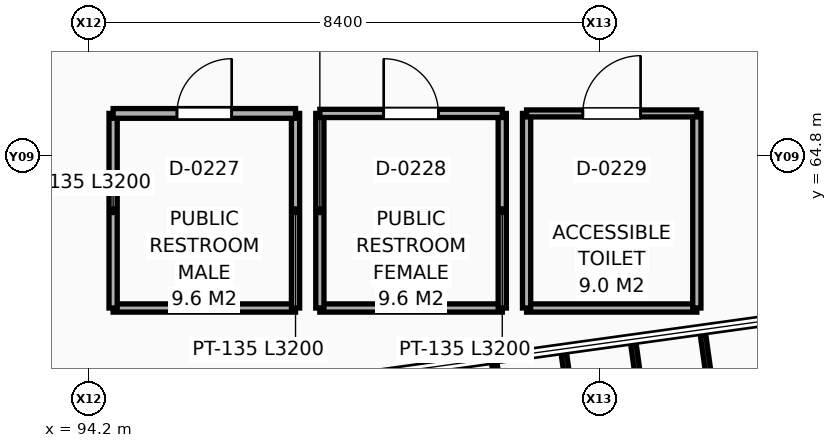
"""IFC4 building model, lengths in metres.
Left out: names, types, materials, properties, quantities, classifications, styles, units other than length and angle.
Written with IfcOpenShell. Run it as: python <this file> out.ifc"""

import sys

from ifc_helpers import new_model, si_unit, direction, frame, frame_2d, origin, place, context, subcontext, project, spatial, rectangle, extrude, element, fill, save


model = new_model("IFC4")
c1 = context("Model", 3, precision=1e-05, world=origin(), true_north=direction((0.0, 1.0)))
c2 = subcontext(c1, "Body", "Model", "MODEL_VIEW")
j1 = project(units=[si_unit("LENGTHUNIT", "METRE"), si_unit("PLANEANGLEUNIT", "RADIAN")], contexts=[c1])
p1 = place(None, origin())
s1 = spatial("IfcSite", under=j1, at=p1, CompositionType="ELEMENT")
p2 = place(p1, origin())
s2 = spatial("IfcBuilding", under=s1, at=p2, CompositionType="ELEMENT")
p3 = place(p2, frame((0.0, 0.0, 13.8)))
s3 = spatial("IfcBuildingStorey", under=s2, at=p3, CompositionType="ELEMENT", Elevation=13.8)
p4 = place(p3, frame((94.6, 62.3, 0.0), z_axis=(0.0, 0.0, 1.0), x_axis=(1.0, 0.0, 0.0)))
e1 = element("IfcWall", 1, at=p4, inside=s3, PredefinedType="PARTITIONING", context=c2, shape_type="SweptSolid", body=[
    extrude(rectangle(XDim=3.0, YDim=0.135, at=frame_2d((1.5, 0.0))), origin(), (0.0, 0.0, 1.0), 3.86),
])
for number, where, z_axis, x_axis in (
    (2, (97.6, 62.3, 0.0), (0.0, 0.0, 1.0), (0.0, 1.0, 0.0)),
    (3, (94.6, 62.3, 0.0), (0.0, 0.0, 1.0), (0.0, 1.0, 0.0)),
):
    element("IfcWall", number, at=place(p3, frame(where, z_axis=z_axis, x_axis=x_axis)), inside=s3, PredefinedType="PARTITIONING", context=c2, shape_type="SweptSolid", body=[
        extrude(rectangle(XDim=3.2, YDim=0.135, at=frame_2d((1.6, 0.0))), origin(), (0.0, 0.0, 1.0), 3.86),
    ])
p5 = place(p3, frame((94.6, 65.5, 0.0), z_axis=(0.0, 0.0, 1.0), x_axis=(1.0, 0.0, 0.0)))
e4 = element("IfcWall", 4, at=p5, inside=s3, PredefinedType="PARTITIONING", context=c2, shape_type="SweptSolid", body=[
    extrude(rectangle(XDim=3.0, YDim=0.16, at=frame_2d((1.5, 0.0))), origin(), (0.0, 0.0, 1.0), 3.86),
])
p6 = place(p5, frame((1.05, 0.0, 0.0)))
e5 = element("IfcOpeningElement", 5, at=p6, cuts=e4, PredefinedType="OPENING", context=c2, shape_type="SweptSolid", body=[
    extrude(rectangle(XDim=0.9, YDim=2.1, at=frame_2d((0.45, 1.05))), frame((0.0, 0.09, 0.0), z_axis=(0.0, -1.0, 0.0), x_axis=(1.0, 0.0, 0.0)), (0.0, 0.0, 1.0), 0.18),
])
p7 = place(p3, frame((98.0, 62.3, 0.0), z_axis=(0.0, 0.0, 1.0), x_axis=(1.0, 0.0, 0.0)))
e6 = element("IfcWall", 6, at=p7, inside=s3, PredefinedType="PARTITIONING", context=c2, shape_type="SweptSolid", body=[
    extrude(rectangle(XDim=3.0, YDim=0.135, at=frame_2d((1.5, 0.0))), origin(), (0.0, 0.0, 1.0), 3.86),
])
for number, where, z_axis, x_axis in (
    (7, (101.0, 62.3, 0.0), (0.0, 0.0, 1.0), (0.0, 1.0, 0.0)),
    (8, (98.0, 62.3, 0.0), (0.0, 0.0, 1.0), (0.0, 1.0, 0.0)),
):
    element("IfcWall", number, at=place(p3, frame(where, z_axis=z_axis, x_axis=x_axis)), inside=s3, PredefinedType="PARTITIONING", context=c2, shape_type="SweptSolid", body=[
        extrude(rectangle(XDim=3.2, YDim=0.135, at=frame_2d((1.6, 0.0))), origin(), (0.0, 0.0, 1.0), 3.86),
    ])
p8 = place(p3, frame((98.0, 65.5, 0.0), z_axis=(0.0, 0.0, 1.0), x_axis=(1.0, 0.0, 0.0)))
e9 = element("IfcWall", 9, at=p8, inside=s3, PredefinedType="PARTITIONING", context=c2, shape_type="SweptSolid", body=[
    extrude(rectangle(XDim=3.0, YDim=0.135, at=frame_2d((1.5, 0.0))), origin(), (0.0, 0.0, 1.0), 3.86),
])
p9 = place(p8, frame((1.05, 0.0, 0.0)))
e10 = element("IfcOpeningElement", 10, at=p9, cuts=e9, PredefinedType="OPENING", context=c2, shape_type="SweptSolid", body=[
    extrude(rectangle(XDim=0.9, YDim=2.1, at=frame_2d((0.45, 1.05))), frame((0.0, 0.077, 0.0), z_axis=(0.0, -1.0, 0.0), x_axis=(1.0, 0.0, 0.0)), (0.0, 0.0, 1.0), 0.155),
])
p10 = place(p3, frame((101.4, 62.3, 0.0), z_axis=(0.0, 0.0, 1.0), x_axis=(1.0, 0.0, 0.0)))
e11 = element("IfcWall", 11, at=p10, inside=s3, PredefinedType="PARTITIONING", context=c2, shape_type="SweptSolid", body=[
    extrude(rectangle(XDim=2.8, YDim=0.135, at=frame_2d((1.4, 0.0))), origin(), (0.0, 0.0, 1.0), 3.86),
])
for number, where, z_axis, x_axis in (
    (12, (104.2, 62.3, 0.0), (0.0, 0.0, 1.0), (0.0, 1.0, 0.0)),
    (13, (101.4, 62.3, 0.0), (0.0, 0.0, 1.0), (0.0, 1.0, 0.0)),
):
    element("IfcWall", number, at=place(p3, frame(where, z_axis=z_axis, x_axis=x_axis)), inside=s3, PredefinedType="PARTITIONING", context=c2, shape_type="SweptSolid", body=[
        extrude(rectangle(XDim=3.2, YDim=0.135, at=frame_2d((1.6, 0.0))), origin(), (0.0, 0.0, 1.0), 3.86),
    ])
p11 = place(p3, frame((101.4, 65.5, 0.0), z_axis=(0.0, 0.0, 1.0), x_axis=(1.0, 0.0, 0.0)))
e14 = element("IfcWall", 14, at=p11, inside=s3, PredefinedType="PARTITIONING", context=c2, shape_type="SweptSolid", body=[
    extrude(rectangle(XDim=2.8, YDim=0.115, at=frame_2d((1.4, 0.0))), origin(), (0.0, 0.0, 1.0), 3.664),
])
p12 = place(p11, frame((0.925, 0.0, 0.0)))
e15 = element("IfcOpeningElement", 15, at=p12, cuts=e14, PredefinedType="OPENING", context=c2, shape_type="SweptSolid", body=[
    extrude(rectangle(XDim=0.95, YDim=2.1, at=frame_2d((0.475, 1.05))), frame((0.0, 0.067, 0.0), z_axis=(0.0, -1.0, 0.0), x_axis=(1.0, 0.0, 0.0)), (0.0, 0.0, 1.0), 0.135),
])
p13 = place(p6, origin())
e16 = element("IfcDoor", 16, at=p13, inside=s3, OperationType="SINGLE_SWING_RIGHT", PredefinedType="DOOR", context=c2, shape_type="SweptSolid", body=[
    extrude(rectangle(XDim=0.9, YDim=2.1, at=frame_2d((0.45, 1.05))), frame((0.0, 0.025, 0.0), z_axis=(0.0, -1.0, 0.0), x_axis=(1.0, 0.0, 0.0)), (0.0, 0.0, 1.0), 0.05),
])
fill(e5, e16)
p14 = place(p9, origin())
e17 = element("IfcDoor", 17, at=p14, inside=s3, OperationType="SINGLE_SWING_LEFT", PredefinedType="DOOR", context=c2, shape_type="SweptSolid", body=[
    extrude(rectangle(XDim=0.9, YDim=2.1, at=frame_2d((0.45, 1.05))), frame((0.0, 0.025, 0.0), z_axis=(0.0, -1.0, 0.0), x_axis=(1.0, 0.0, 0.0)), (0.0, 0.0, 1.0), 0.05),
])
fill(e10, e17)
p15 = place(p12, origin())
e18 = element("IfcDoor", 18, at=p15, inside=s3, OperationType="SINGLE_SWING_RIGHT", PredefinedType="DOOR", context=c2, shape_type="SweptSolid", body=[
    extrude(rectangle(XDim=0.95, YDim=2.1, at=frame_2d((0.475, 1.05))), frame((0.0, 0.025, 0.0), z_axis=(0.0, -1.0, 0.0), x_axis=(1.0, 0.0, 0.0)), (0.0, 0.0, 1.0), 0.05),
])
fill(e15, e18)
save(model, sys.argv[1])
